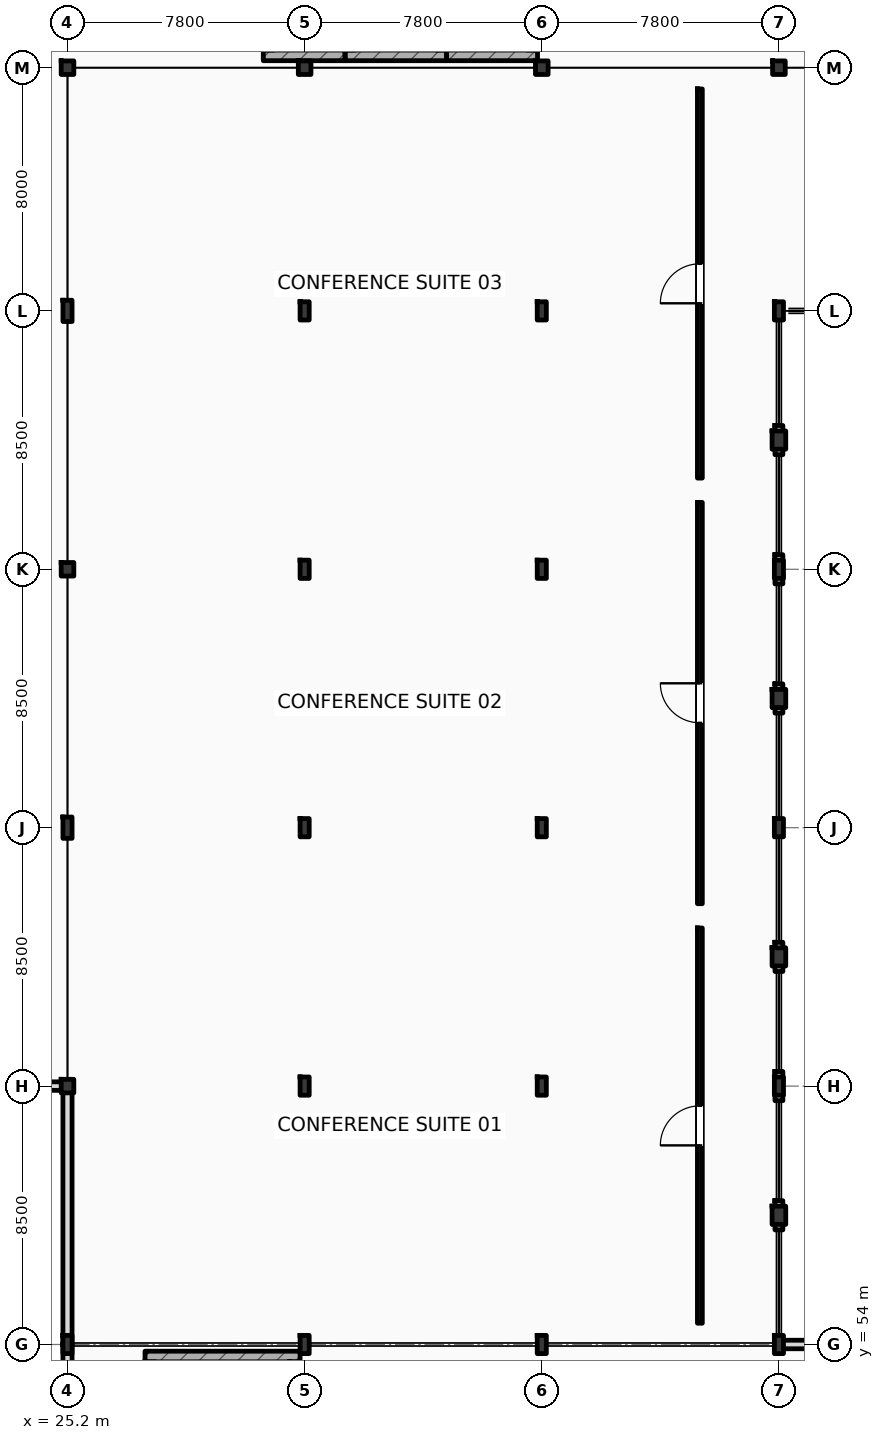
"""IFC4 building model, lengths in metres.
Left out: names, types, materials, properties, quantities, classifications, styles, units other than length and angle.
Written with IfcOpenShell. Run it as: python <this file> out.ifc"""

import sys

from ifc_helpers import new_model, si_unit, direction, frame, frame_2d, origin, origin_2d, place, context, subcontext, project, spatial, rectangle, i_section, extrude, element, fill, save


model = new_model("IFC4")
c1 = context("Model", 3, precision=1e-05, world=origin(), true_north=direction((0.0, 1.0)))
c2 = subcontext(c1, "Body", "Model", "MODEL_VIEW")
j1 = project(units=[si_unit("LENGTHUNIT", "METRE"), si_unit("PLANEANGLEUNIT", "RADIAN")], contexts=[c1])
p1 = place(None, origin())
s1 = spatial("IfcSite", under=j1, at=p1, CompositionType="ELEMENT")
p2 = place(p1, origin())
s2 = spatial("IfcBuilding", under=s1, at=p2, CompositionType="ELEMENT")
p3 = place(p2, frame((0.0, 0.0, 6.0)))
s3 = spatial("IfcBuildingStorey", under=s2, at=p3, CompositionType="ELEMENT", Elevation=6.0)
p4 = place(p3, frame((25.2, 62.5, 0.0), z_axis=(0.0, 0.0, 1.0), x_axis=(1.0, 0.0, 0.0)))
e1 = element("IfcColumn", 1, at=p4, inside=s3, PredefinedType="COLUMN", context=c2, shape_type="SweptSolid", body=[
    extrude(i_section(OverallWidth=0.416, OverallDepth=0.446, WebThickness=0.036, FlangeThickness=0.048, FilletRadius=0.015, at=origin_2d()), origin(), (0.0, 0.0, 1.0), 5.4),
])
p5 = place(p3, frame((25.2, 71.0, 0.0), z_axis=(0.0, 0.0, 1.0), x_axis=(1.0, 0.0, 0.0)))
e2 = element("IfcColumn", 2, at=p5, inside=s3, PredefinedType="COLUMN", context=c2, shape_type="SweptSolid", body=[
    extrude(i_section(OverallWidth=0.3, OverallDepth=0.7, WebThickness=0.017, FlangeThickness=0.032, FilletRadius=0.027, at=origin_2d()), origin(), (0.0, 0.0, 1.0), 5.4),
])
p6 = place(p3, frame((25.2, 79.5, 0.0), z_axis=(0.0, 0.0, 1.0), x_axis=(1.0, 0.0, 0.0)))
e3 = element("IfcColumn", 3, at=p6, inside=s3, PredefinedType="COLUMN", context=c2, shape_type="SweptSolid", body=[
    extrude(i_section(OverallWidth=0.416, OverallDepth=0.446, WebThickness=0.036, FlangeThickness=0.048, FilletRadius=0.015, at=origin_2d()), origin(), (0.0, 0.0, 1.0), 5.4),
])
p7 = place(p3, frame((25.2, 88.0, 0.0), z_axis=(0.0, 0.0, 1.0), x_axis=(1.0, 0.0, 0.0)))
e4 = element("IfcColumn", 4, at=p7, inside=s3, PredefinedType="COLUMN", context=c2, shape_type="SweptSolid", body=[
    extrude(i_section(OverallWidth=0.3, OverallDepth=0.7, WebThickness=0.017, FlangeThickness=0.032, FilletRadius=0.027, at=origin_2d()), origin(), (0.0, 0.0, 1.0), 5.4),
])
for number, where, z_axis, x_axis in (
    (5, (25.2, 96.0, 0.0), (0.0, 0.0, 1.0), (1.0, 0.0, 0.0)),
    (6, (33.0, 96.0, 0.0), (0.0, 0.0, 1.0), (1.0, 0.0, 0.0)),
    (7, (40.8, 96.0, 0.0), (0.0, 0.0, 1.0), (1.0, 0.0, 0.0)),
    (8, (48.6, 96.0, 0.0), (0.0, 0.0, 1.0), (1.0, 0.0, 0.0)),
):
    element("IfcColumn", number, at=place(p3, frame(where, z_axis=z_axis, x_axis=x_axis)), inside=s3, PredefinedType="COLUMN", context=c2, shape_type="SweptSolid", body=[
        extrude(i_section(OverallWidth=0.416, OverallDepth=0.446, WebThickness=0.036, FlangeThickness=0.048, FilletRadius=0.015, at=origin_2d()), origin(), (0.0, 0.0, 1.0), 5.4),
    ])
for number, where, z_axis, x_axis in (
    (9, (25.2, 54.0, 0.0), (0.0, 0.0, 1.0), (1.0, 0.0, 0.0)),
    (10, (33.0, 54.0, 0.0), (0.0, 0.0, 1.0), (1.0, 0.0, 0.0)),
    (11, (33.0, 62.5, 0.0), (0.0, 0.0, 1.0), (1.0, 0.0, 0.0)),
    (12, (33.0, 71.0, 0.0), (0.0, 0.0, 1.0), (1.0, 0.0, 0.0)),
    (13, (33.0, 79.5, 0.0), (0.0, 0.0, 1.0), (1.0, 0.0, 0.0)),
    (14, (33.0, 88.0, 0.0), (0.0, 0.0, 1.0), (1.0, 0.0, 0.0)),
    (15, (40.8, 54.0, 0.0), (0.0, 0.0, 1.0), (1.0, 0.0, 0.0)),
    (16, (40.8, 62.5, 0.0), (0.0, 0.0, 1.0), (1.0, 0.0, 0.0)),
    (17, (40.8, 71.0, 0.0), (0.0, 0.0, 1.0), (1.0, 0.0, 0.0)),
    (18, (40.8, 79.5, 0.0), (0.0, 0.0, 1.0), (1.0, 0.0, 0.0)),
    (19, (40.8, 88.0, 0.0), (0.0, 0.0, 1.0), (1.0, 0.0, 0.0)),
    (20, (48.6, 54.0, 0.0), (0.0, 0.0, 1.0), (1.0, 0.0, 0.0)),
    (21, (48.6, 62.5, 0.0), (0.0, 0.0, 1.0), (1.0, 0.0, 0.0)),
    (22, (48.6, 71.0, 0.0), (0.0, 0.0, 1.0), (1.0, 0.0, 0.0)),
    (23, (48.6, 79.5, 0.0), (0.0, 0.0, 1.0), (1.0, 0.0, 0.0)),
    (24, (48.6, 88.0, 0.0), (0.0, 0.0, 1.0), (1.0, 0.0, 0.0)),
):
    element("IfcColumn", number, at=place(p3, frame(where, z_axis=z_axis, x_axis=x_axis)), inside=s3, PredefinedType="COLUMN", context=c2, shape_type="SweptSolid", body=[
        extrude(i_section(OverallWidth=0.3, OverallDepth=0.6, WebThickness=0.015, FlangeThickness=0.03, FilletRadius=0.027, at=origin_2d()), origin(), (0.0, 0.0, 1.0), 5.4),
    ])
for number, where, z_axis, x_axis in (
    (25, (48.6, 58.25, 0.0), (0.0, 0.0, 1.0), (1.0, 0.0, 0.0)),
    (26, (48.6, 66.75, 0.0), (0.0, 0.0, 1.0), (1.0, 0.0, 0.0)),
    (27, (48.6, 75.25, 0.0), (0.0, 0.0, 1.0), (1.0, 0.0, 0.0)),
    (28, (48.6, 83.75, 0.0), (0.0, 0.0, 1.0), (1.0, 0.0, 0.0)),
):
    element("IfcColumn", number, at=place(p3, frame(where, z_axis=z_axis, x_axis=x_axis)), inside=s3, PredefinedType="PILASTER", context=c2, shape_type="SweptSolid", body=[
        extrude(rectangle(XDim=0.45, YDim=0.6, at=origin_2d()), origin(), (0.0, 0.0, 1.0), 5.4),
    ])
p8 = place(p3, frame((27.75, 53.605, 0.0), z_axis=(0.0, 0.0, 1.0), x_axis=(1.0, 0.0, 0.0)))
e29 = element("IfcWall", 29, at=p8, inside=s3, PredefinedType="SHEAR", context=c2, shape_type="SweptSolid", body=[
    extrude(rectangle(XDim=5.1, YDim=0.35, at=frame_2d((2.55, 0.0))), origin(), (0.0, 0.0, 1.0), 5.4),
])
p9 = place(p3, frame((25.2, 45.0, 0.0), z_axis=(0.0, 0.0, 1.0), x_axis=(0.0, 1.0, 0.0)))
e30 = element("IfcWall", 30, at=p9, inside=s3, PredefinedType="STANDARD", context=c2, shape_type="SweptSolid", body=[
    extrude(rectangle(XDim=9.0, YDim=0.3, at=frame_2d((4.5, 0.0))), origin(), (0.0, 0.0, 1.0), 4.59),
])
p10 = place(p9, frame((3.45, 0.0, 1.05)))
e31 = element("IfcOpeningElement", 31, at=p10, cuts=e30, PredefinedType="OPENING", context=c2, shape_type="SweptSolid", body=[
    extrude(rectangle(XDim=2.1, YDim=2.2, at=frame_2d((1.05, 1.1))), frame((0.0, 0.16, 0.0), z_axis=(0.0, -1.0, 0.0), x_axis=(1.0, 0.0, 0.0)), (0.0, 0.0, 1.0), 0.32),
])
p11 = place(p3, frame((48.6, 54.0, 0.0), z_axis=(0.0, 0.0, 1.0), x_axis=(1.0, 0.0, 0.0)))
e32 = element("IfcWall", 32, at=p11, inside=s3, PredefinedType="STANDARD", context=c2, shape_type="SweptSolid", body=[
    extrude(rectangle(XDim=15.6, YDim=0.28, at=frame_2d((7.8, 0.0))), origin(), (0.0, 0.0, 1.0), 4.54),
])
p12 = place(p11, frame((8.75, 0.0, 1.05)))
e33 = element("IfcOpeningElement", 33, at=p12, cuts=e32, PredefinedType="OPENING", context=c2, shape_type="SweptSolid", body=[
    extrude(rectangle(XDim=2.1, YDim=2.2, at=frame_2d((1.05, 1.1))), frame((0.0, 0.15, 0.0), z_axis=(0.0, -1.0, 0.0), x_axis=(1.0, 0.0, 0.0)), (0.0, 0.0, 1.0), 0.3),
])
for number, where, z_axis, x_axis in (
    (34, (48.6, 57.77, 0.0), (0.0, 0.0, 1.0), (0.0, 1.0, 0.0)),
    (35, (48.6, 62.02, 0.0), (0.0, 0.0, 1.0), (0.0, 1.0, 0.0)),
    (36, (48.6, 66.27, 0.0), (0.0, 0.0, 1.0), (0.0, 1.0, 0.0)),
    (37, (48.6, 74.77, 0.0), (0.0, 0.0, 1.0), (0.0, 1.0, 0.0)),
    (38, (48.6, 79.02, 0.0), (0.0, 0.0, 1.0), (0.0, 1.0, 0.0)),
    (39, (48.6, 83.27, 0.0), (0.0, 0.0, 1.0), (0.0, 1.0, 0.0)),
):
    element("IfcWall", number, at=place(p3, frame(where, z_axis=z_axis, x_axis=x_axis)), inside=s3, PredefinedType="STANDARD", context=c2, shape_type="SweptSolid", body=[
        extrude(rectangle(XDim=0.96, YDim=0.26, at=frame_2d((0.48, 0.0))), origin(), (0.0, 0.0, 1.0), 4.55),
    ])
p13 = place(p3, frame((25.2, 54.0, 0.0), z_axis=(0.0, 0.0, 1.0), x_axis=(0.0, 1.0, 0.0)))
e40 = element("IfcWall", 40, at=p13, inside=s3, PredefinedType="STANDARD", context=c2, shape_type="SweptSolid", body=[
    extrude(rectangle(XDim=8.5, YDim=0.3, at=frame_2d((4.25, 0.0))), origin(), (0.0, 0.0, 1.0), 4.55),
])
p14 = place(p3, frame((0.0, 62.5, 0.0), z_axis=(0.0, 0.0, 1.0), x_axis=(1.0, 0.0, 0.0)))
e41 = element("IfcWall", 41, at=p14, inside=s3, PredefinedType="STANDARD", context=c2, shape_type="SweptSolid", body=[
    extrude(rectangle(XDim=25.2, YDim=0.28, at=frame_2d((12.6, 0.0))), origin(), (0.0, 0.0, 1.0), 2.84),
])
p15 = place(p3, frame((31.64, 96.405, 0.0), z_axis=(0.0, 0.0, 1.0), x_axis=(1.0, 0.0, 0.0)))
e42 = element("IfcWall", 42, at=p15, inside=s3, PredefinedType="SHEAR", context=c2, shape_type="SweptSolid", body=[
    extrude(rectangle(XDim=2.69, YDim=0.35, at=frame_2d((1.345, 0.0))), origin(), (0.0, 0.0, 1.0), 5.05),
])
p16 = place(p3, frame((34.33, 96.405, 0.0), z_axis=(0.0, 0.0, 1.0), x_axis=(1.0, 0.0, 0.0)))
e43 = element("IfcWall", 43, at=p16, inside=s3, PredefinedType="SHEAR", context=c2, shape_type="SweptSolid", body=[
    extrude(rectangle(XDim=3.34, YDim=0.35, at=frame_2d((1.67, 0.0))), origin(), (0.0, 0.0, 1.0), 5.05),
])
p17 = place(p3, frame((37.67, 96.405, 0.0), z_axis=(0.0, 0.0, 1.0), x_axis=(1.0, 0.0, 0.0)))
e44 = element("IfcWall", 44, at=p17, inside=s3, PredefinedType="SHEAR", context=c2, shape_type="SweptSolid", body=[
    extrude(rectangle(XDim=2.99, YDim=0.35, at=frame_2d((1.495, 0.0))), origin(), (0.0, 0.0, 1.0), 5.05),
])
p18 = place(p3, frame((46.0, 54.7, 0.0), z_axis=(0.0, 0.0, 1.0), x_axis=(0.0, 1.0, 0.0)))
e45 = element("IfcWall", 45, at=p18, inside=s3, PredefinedType="PARTITIONING", context=c2, shape_type="SweptSolid", body=[
    extrude(rectangle(XDim=13.0, YDim=0.16, at=frame_2d((6.5, 0.0))), origin(), (0.0, 0.0, 1.0), 4.71),
])
p19 = place(p18, frame((5.85, 0.0, 0.0)))
e46 = element("IfcOpeningElement", 46, at=p19, cuts=e45, PredefinedType="OPENING", context=c2, shape_type="SweptSolid", body=[
    extrude(rectangle(XDim=1.3, YDim=2.2, at=frame_2d((0.65, 1.1))), frame((0.0, 0.09, 0.0), z_axis=(0.0, -1.0, 0.0), x_axis=(1.0, 0.0, 0.0)), (0.0, 0.0, 1.0), 0.18),
])
p20 = place(p3, frame((46.0, 68.5, 0.0), z_axis=(0.0, 0.0, 1.0), x_axis=(0.0, 1.0, 0.0)))
e47 = element("IfcWall", 47, at=p20, inside=s3, PredefinedType="PARTITIONING", context=c2, shape_type="SweptSolid", body=[
    extrude(rectangle(XDim=13.2, YDim=0.16, at=frame_2d((6.6, 0.0))), origin(), (0.0, 0.0, 1.0), 4.71),
])
p21 = place(p20, frame((5.95, 0.0, 0.0)))
e48 = element("IfcOpeningElement", 48, at=p21, cuts=e47, PredefinedType="OPENING", context=c2, shape_type="SweptSolid", body=[
    extrude(rectangle(XDim=1.3, YDim=2.2, at=frame_2d((0.65, 1.1))), frame((0.0, 0.09, 0.0), z_axis=(0.0, -1.0, 0.0), x_axis=(1.0, 0.0, 0.0)), (0.0, 0.0, 1.0), 0.18),
])
p22 = place(p3, frame((46.0, 82.5, 0.0), z_axis=(0.0, 0.0, 1.0), x_axis=(0.0, 1.0, 0.0)))
e49 = element("IfcWall", 49, at=p22, inside=s3, PredefinedType="PARTITIONING", context=c2, shape_type="SweptSolid", body=[
    extrude(rectangle(XDim=12.8, YDim=0.16, at=frame_2d((6.4, 0.0))), origin(), (0.0, 0.0, 1.0), 4.71),
])
p23 = place(p22, frame((5.75, 0.0, 0.0)))
e50 = element("IfcOpeningElement", 50, at=p23, cuts=e49, PredefinedType="OPENING", context=c2, shape_type="SweptSolid", body=[
    extrude(rectangle(XDim=1.3, YDim=2.2, at=frame_2d((0.65, 1.1))), frame((0.0, 0.09, 0.0), z_axis=(0.0, -1.0, 0.0), x_axis=(1.0, 0.0, 0.0)), (0.0, 0.0, 1.0), 0.18),
])
p24 = place(p19, origin())
e51 = element("IfcDoor", 51, at=p24, inside=s3, OperationType="SINGLE_SWING_LEFT", PredefinedType="DOOR", context=c2, shape_type="SweptSolid", body=[
    extrude(rectangle(XDim=1.3, YDim=2.2, at=frame_2d((0.65, 1.1))), frame((0.0, 0.025, 0.0), z_axis=(0.0, -1.0, 0.0), x_axis=(1.0, 0.0, 0.0)), (0.0, 0.0, 1.0), 0.05),
])
fill(e46, e51)
p25 = place(p21, origin())
e52 = element("IfcDoor", 52, at=p25, inside=s3, OperationType="SINGLE_SWING_RIGHT", PredefinedType="DOOR", context=c2, shape_type="SweptSolid", body=[
    extrude(rectangle(XDim=1.3, YDim=2.2, at=frame_2d((0.65, 1.1))), frame((0.0, 0.025, 0.0), z_axis=(0.0, -1.0, 0.0), x_axis=(1.0, 0.0, 0.0)), (0.0, 0.0, 1.0), 0.05),
])
fill(e48, e52)
p26 = place(p23, origin())
e53 = element("IfcDoor", 53, at=p26, inside=s3, OperationType="SINGLE_SWING_LEFT", PredefinedType="DOOR", context=c2, shape_type="SweptSolid", body=[
    extrude(rectangle(XDim=1.3, YDim=2.2, at=frame_2d((0.65, 1.1))), frame((0.0, 0.025, 0.0), z_axis=(0.0, -1.0, 0.0), x_axis=(1.0, 0.0, 0.0)), (0.0, 0.0, 1.0), 0.05),
])
fill(e50, e53)
save(model, sys.argv[1])
